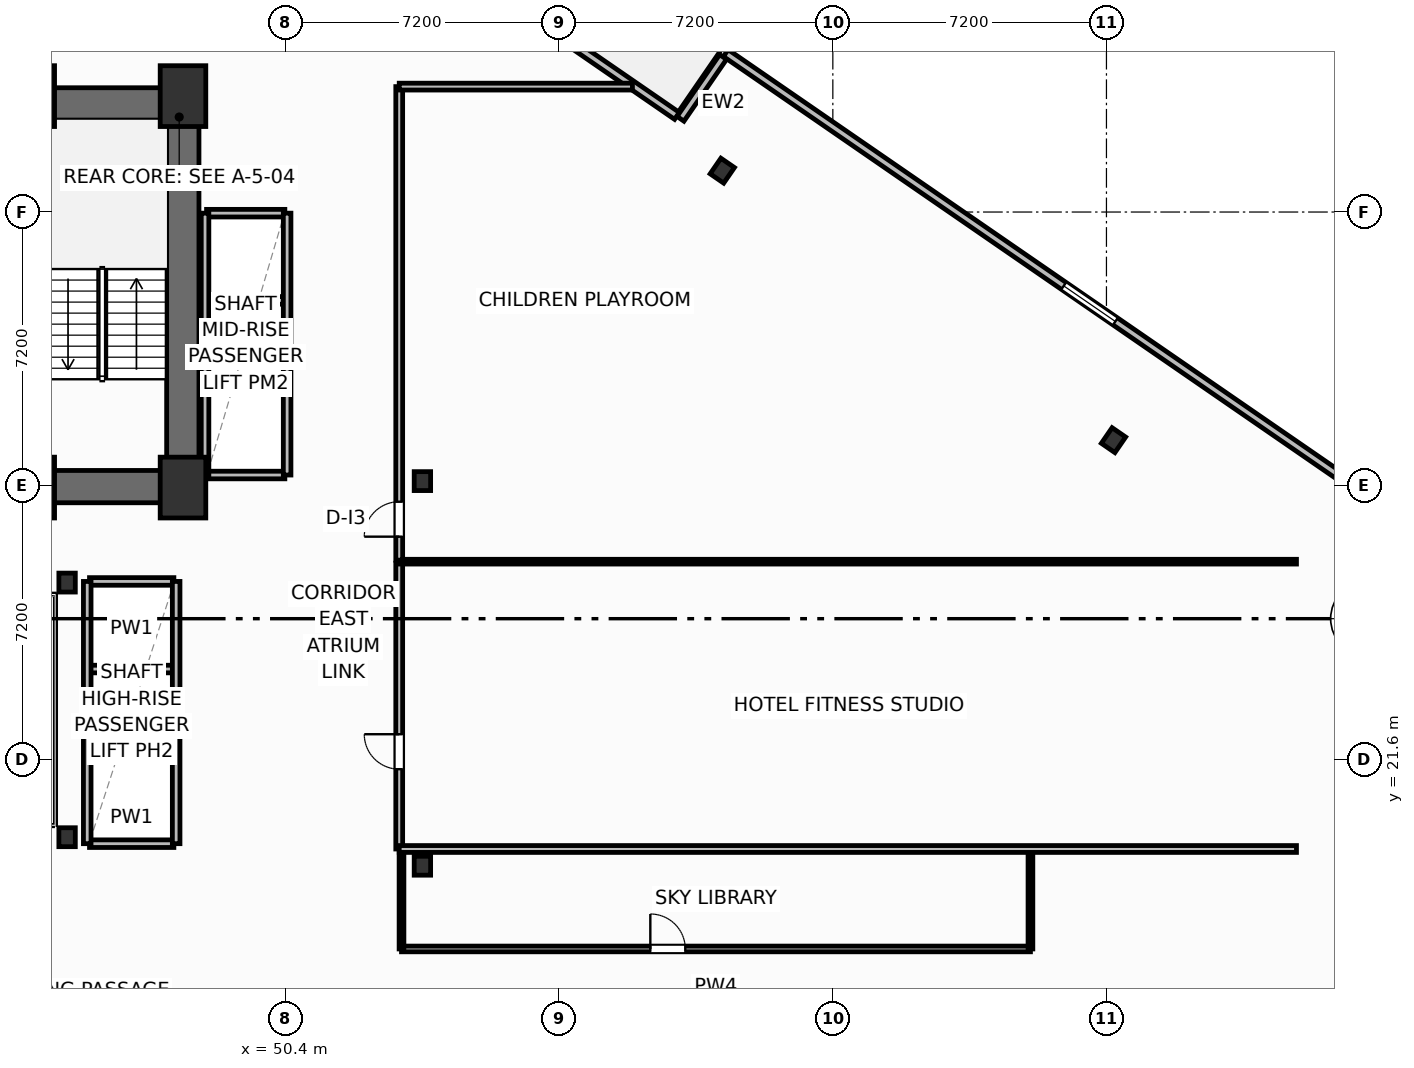
"""IFC4 building model, lengths in metres.
Left out: names, types, materials, properties, quantities, classifications, styles, units other than length and angle.
Written with IfcOpenShell. Run it as: python <this file> out.ifc"""

import sys

from ifc_helpers import new_model, si_unit, direction, frame, frame_2d, origin, origin_2d, place, context, subcontext, project, spatial, rectangle, i_section, extrude, element, fill, save


model = new_model("IFC4")
c1 = context("Model", 3, precision=1e-05, world=origin(), true_north=direction((0.0, 1.0)))
c2 = subcontext(c1, "Body", "Model", "MODEL_VIEW")
j1 = project(units=[si_unit("LENGTHUNIT", "METRE"), si_unit("PLANEANGLEUNIT", "RADIAN")], contexts=[c1])
p1 = place(None, origin())
s1 = spatial("IfcSite", under=j1, at=p1, CompositionType="ELEMENT")
p2 = place(p1, origin())
s2 = spatial("IfcBuilding", under=s1, at=p2, CompositionType="ELEMENT")
p3 = place(p2, frame((0.0, 0.0, 64.0)))
s3 = spatial("IfcBuildingStorey", under=s2, at=p3, CompositionType="ELEMENT", Elevation=64.0)
for number, where, z_axis, x_axis in (
    (1, (43.72, 28.75, 0.0), (0.0, 0.0, 1.0), (1.0, 0.0, 0.0)),
    (2, (47.7, 28.75, 0.0), (0.0, 0.0, 1.0), (1.0, 0.0, 0.0)),
    (3, (43.72, 39.05, 0.0), (0.0, 0.0, 1.0), (1.0, 0.0, 0.0)),
    (4, (47.7, 39.05, 0.0), (0.0, 0.0, 1.0), (1.0, 0.0, 0.0)),
):
    element("IfcColumn", number, at=place(p3, frame(where, z_axis=z_axis, x_axis=x_axis)), inside=s3, PredefinedType="COLUMN", context=c2, shape_type="SweptSolid", body=[
        extrude(rectangle(XDim=1.2, YDim=1.6, at=origin_2d()), origin(), (0.0, 0.0, 1.0), 3.7),
    ])
for number, where, z_axis, x_axis in (
    (5, (44.65, 19.55, 0.0), (0.0, 0.0, 1.0), (1.0, 0.0, 0.0)),
    (6, (44.65, 26.25, 0.0), (0.0, 0.0, 1.0), (1.0, 0.0, 0.0)),
    (7, (54.0, 18.8, 0.0), (0.0, 0.0, 1.0), (1.0, 0.0, 0.0)),
    (8, (54.0, 28.92, 0.0), (0.0, 0.0, 1.0), (1.0, 0.0, 0.0)),
):
    element("IfcColumn", number, at=place(p3, frame(where, z_axis=z_axis, x_axis=x_axis)), inside=s3, PredefinedType="COLUMN", context=c2, shape_type="SweptSolid", body=[
        extrude(i_section(OverallWidth=0.432, OverallDepth=0.498, WebThickness=0.056, FlangeThickness=0.089, FilletRadius=0.025, at=origin_2d()), origin(), (0.0, 0.0, 1.0), 3.7),
    ])
p4 = place(p3, frame((30.28, 38.845, 0.0), z_axis=(0.0, 0.0, 1.0), x_axis=(1.0, 0.0, 0.0)))
e9 = element("IfcWall", 9, at=p4, inside=s3, PredefinedType="SHEAR", context=c2, shape_type="SweptSolid", body=[
    extrude(rectangle(XDim=17.84, YDim=0.85, at=frame_2d((8.92, 0.0))), origin(), (0.0, 0.0, 1.0), 3.45),
])
p5 = place(p3, frame((47.695, 29.2, 0.0), z_axis=(0.0, 0.0, 1.0), x_axis=(0.0, 1.0, 0.0)))
e10 = element("IfcWall", 10, at=p5, inside=s3, PredefinedType="SHEAR", context=c2, shape_type="SweptSolid", body=[
    extrude(rectangle(XDim=9.22, YDim=0.85, at=frame_2d((4.61, 0.0))), origin(), (0.0, 0.0, 1.0), 3.45),
])
p6 = place(p3, frame((43.6, 28.775, 0.0), z_axis=(0.0, 0.0, 1.0), x_axis=(1.0, 0.0, 0.0)))
e11 = element("IfcWall", 11, at=p6, inside=s3, PredefinedType="SHEAR", context=c2, shape_type="SweptSolid", body=[
    extrude(rectangle(XDim=4.52, YDim=0.85, at=frame_2d((2.26, 0.0))), origin(), (0.0, 0.0, 1.0), 3.45),
])
for number, where, z_axis, x_axis in (
    (12, (72.186, 29.997, 0.0), (0.0, 0.0, 1.0), (0.824, -0.567, 0.0)),
    (13, (61.891, 37.088, 0.0), (0.0, 0.0, 1.0), (0.824, -0.567, 0.0)),
):
    element("IfcColumn", number, at=place(p3, frame(where, z_axis=z_axis, x_axis=x_axis)), inside=s3, PredefinedType="COLUMN", context=c2, shape_type="SweptSolid", body=[
        extrude(i_section(OverallWidth=0.432, OverallDepth=0.498, WebThickness=0.056, FlangeThickness=0.089, FilletRadius=0.025, at=origin_2d()), origin(), (0.0, 0.0, 1.0), 3.7),
    ])
p7 = place(p3, frame((55.757, 41.933, 0.0), z_axis=(0.0, 0.0, 1.0), x_axis=(0.823534636215, -0.567265989598, 0.0)))
e14 = element("IfcWall", 14, at=p7, inside=s3, PredefinedType="SOLIDWALL", context=c2, shape_type="SweptSolid", body=[
    extrude(rectangle(XDim=6.0, YDim=0.22, at=frame_2d((3.0, 0.0))), origin(), (0.0, 0.0, 1.0), 2.73),
])
p8 = place(p7, frame((0.696, 0.0, 0.0)))
e15 = element("IfcOpeningElement", 15, at=p8, cuts=e14, PredefinedType="OPENING", context=c2, shape_type="SweptSolid", body=[
    extrude(rectangle(XDim=1.5, YDim=2.25, at=frame_2d((0.75, 1.125))), frame((0.0, 0.12, 0.0), z_axis=(0.0, -1.0, 0.0), x_axis=(1.0, 0.0, 0.0)), (0.0, 0.0, 1.0), 0.24),
])
p9 = place(p3, frame((81.127, 26.995, 0.0), z_axis=(0.0, 0.0, 1.0), x_axis=(-0.823530169317, 0.567272474411, 0.0)))
e16 = element("IfcWall", 16, at=p9, inside=s3, PredefinedType="SOLIDWALL", context=c2, shape_type="SweptSolid", body=[
    extrude(rectangle(XDim=23.247, YDim=0.22, at=frame_2d((11.624, 0.0))), origin(), (0.0, 0.0, 1.0), 2.73),
])
p10 = place(p9, frame((10.799, 0.0, 0.8)))
e17 = element("IfcOpeningElement", 17, at=p10, cuts=e16, PredefinedType="OPENING", context=c2, shape_type="SweptSolid", body=[
    extrude(rectangle(XDim=1.65, YDim=1.65, at=frame_2d((0.825, 0.825))), frame((0.0, 0.12, 0.0), z_axis=(0.0, -1.0, 0.0), x_axis=(1.0, 0.0, 0.0)), (0.0, 0.0, 1.0), 0.24),
])
p11 = place(p3, frame((61.912, 40.079, 0.0), z_axis=(0.0, 0.0, 1.0), x_axis=(-0.567189720735, -0.82358716642, 0.0)))
e18 = element("IfcWall", 18, at=p11, inside=s3, PredefinedType="SOLIDWALL", context=c2, shape_type="SweptSolid", body=[
    extrude(rectangle(XDim=1.975, YDim=0.22, at=frame_2d((0.987, 0.0))), origin(), (0.0, 0.0, 1.0), 2.73),
])
p12 = place(p3, frame((53.45, 16.61, 0.0), z_axis=(0.0, 0.0, 1.0), x_axis=(1.0, 0.0, 0.0)))
e19 = element("IfcWall", 19, at=p12, inside=s3, PredefinedType="PARTITIONING", context=c2, shape_type="SweptSolid", body=[
    extrude(rectangle(XDim=16.55, YDim=0.15, at=frame_2d((8.275, 0.0))), origin(), (0.0, 0.0, 1.0), 2.58),
])
p13 = place(p12, frame((6.548, 0.0, 0.0)))
e20 = element("IfcOpeningElement", 20, at=p13, cuts=e19, PredefinedType="OPENING", context=c2, shape_type="SweptSolid", body=[
    extrude(rectangle(XDim=0.92, YDim=2.05, at=frame_2d((0.46, 1.025))), frame((0.0, 0.085, 0.0), z_axis=(0.0, -1.0, 0.0), x_axis=(1.0, 0.0, 0.0)), (0.0, 0.0, 1.0), 0.17),
])
for number, where, z_axis, x_axis in (
    (21, (53.45, 16.61, 0.0), (0.0, 0.0, 1.0), (0.0, 1.0, 0.0)),
    (22, (70.0, 16.61, 0.0), (0.0, 0.0, 1.0), (0.0, 1.0, 0.0)),
):
    element("IfcWall", number, at=place(p3, frame(where, z_axis=z_axis, x_axis=x_axis)), inside=s3, PredefinedType="PARTITIONING", context=c2, shape_type="SweptSolid", body=[
        extrude(rectangle(XDim=2.63, YDim=0.125, at=frame_2d((1.315, 0.0))), origin(), (0.0, 0.0, 1.0), 3.45),
    ])
p14 = place(p3, frame((53.39, 19.24, 0.0), z_axis=(0.0, 0.0, 1.0), x_axis=(0.0, 1.0, 0.0)))
e23 = element("IfcWall", 23, at=p14, inside=s3, PredefinedType="PARTITIONING", context=c2, shape_type="SweptSolid", body=[
    extrude(rectangle(XDim=7.52, YDim=0.18, at=frame_2d((3.76, 0.0))), origin(), (0.0, 0.0, 1.0), 3.45),
])
p15 = place(p14, frame((2.1, 0.0, 0.0)))
e24 = element("IfcOpeningElement", 24, at=p15, cuts=e23, PredefinedType="OPENING", context=c2, shape_type="SweptSolid", body=[
    extrude(rectangle(XDim=0.92, YDim=2.05, at=frame_2d((0.46, 1.025))), frame((0.0, 0.1, 0.0), z_axis=(0.0, -1.0, 0.0), x_axis=(1.0, 0.0, 0.0)), (0.0, 0.0, 1.0), 0.2),
])
p16 = place(p3, frame((53.39, 26.8, 0.0), z_axis=(0.0, 0.0, 1.0), x_axis=(1.0, 0.0, 0.0)))
e25 = element("IfcWall", 25, at=p16, inside=s3, PredefinedType="PARTITIONING", context=c2, shape_type="SweptSolid", body=[
    extrude(rectangle(XDim=23.61, YDim=0.125, at=frame_2d((11.805, 0.0))), origin(), (0.0, 0.0, 1.0), 3.45),
])
p17 = place(p3, frame((53.39, 19.24, 0.0), z_axis=(0.0, 0.0, 1.0), x_axis=(1.0, 0.0, 0.0)))
e26 = element("IfcWall", 26, at=p17, inside=s3, PredefinedType="PARTITIONING", context=c2, shape_type="SweptSolid", body=[
    extrude(rectangle(XDim=23.61, YDim=0.18, at=frame_2d((11.805, 0.0))), origin(), (0.0, 0.0, 1.0), 3.45),
])
p18 = place(p3, frame((53.39, 26.84, 0.0), z_axis=(0.0, 0.0, 1.0), x_axis=(0.0, 1.0, 0.0)))
e27 = element("IfcWall", 27, at=p18, inside=s3, PredefinedType="PARTITIONING", context=c2, shape_type="SweptSolid", body=[
    extrude(rectangle(XDim=12.46, YDim=0.18, at=frame_2d((6.23, 0.0))), origin(), (0.0, 0.0, 1.0), 3.45),
])
p19 = place(p18, frame((0.618, 0.0, 0.0)))
e28 = element("IfcOpeningElement", 28, at=p19, cuts=e27, PredefinedType="OPENING", context=c2, shape_type="SweptSolid", body=[
    extrude(rectangle(XDim=0.92, YDim=2.05, at=frame_2d((0.46, 1.025))), frame((0.0, 0.1, 0.0), z_axis=(0.0, -1.0, 0.0), x_axis=(1.0, 0.0, 0.0)), (0.0, 0.0, 1.0), 0.2),
])
p20 = place(p3, frame((53.39, 39.3, 0.0), z_axis=(0.0, 0.0, 1.0), x_axis=(1.0, 0.0, 0.0)))
e29 = element("IfcWall", 29, at=p20, inside=s3, PredefinedType="PARTITIONING", context=c2, shape_type="SweptSolid", body=[
    extrude(rectangle(XDim=6.136, YDim=0.18, at=frame_2d((3.068, 0.0))), origin(), (0.0, 0.0, 1.0), 3.45),
])
for number, where, z_axis, x_axis in (
    (30, (48.32, 31.375, 0.0), (0.0, 0.0, 1.0), (1.0, 0.0, 0.0)),
    (31, (48.32, 33.675, 0.0), (0.0, 0.0, 1.0), (1.0, 0.0, 0.0)),
):
    element("IfcWall", number, at=place(p3, frame(where, z_axis=z_axis, x_axis=x_axis)), inside=s3, PredefinedType="PARTITIONING", context=c2, shape_type="SweptSolid", body=[
        extrude(rectangle(XDim=2.06, YDim=0.2, at=frame_2d((1.03, 0.0))), origin(), (0.0, 0.0, 1.0), 3.45),
    ])
p21 = place(p3, frame((48.32, 29.08, 0.0), z_axis=(0.0, 0.0, 1.0), x_axis=(1.0, 0.0, 0.0)))
e32 = element("IfcWall", 32, at=p21, inside=s3, PredefinedType="PARTITIONING", context=c2, shape_type="SweptSolid", body=[
    extrude(rectangle(XDim=2.06, YDim=0.2, at=frame_2d((1.03, 0.0))), origin(), (0.0, 0.0, 1.0), 2.662),
])
p22 = place(p3, frame((48.32, 35.97, 0.0), z_axis=(0.0, 0.0, 1.0), x_axis=(1.0, 0.0, 0.0)))
e33 = element("IfcWall", 33, at=p22, inside=s3, PredefinedType="PARTITIONING", context=c2, shape_type="SweptSolid", body=[
    extrude(rectangle(XDim=2.06, YDim=0.2, at=frame_2d((1.03, 0.0))), origin(), (0.0, 0.0, 1.0), 3.45),
])
for number, where, z_axis, x_axis in (
    (34, (48.28, 29.08, 0.0), (0.0, 0.0, 1.0), (0.0, 1.0, 0.0)),
    (35, (50.44, 29.08, 0.0), (0.0, 0.0, 1.0), (0.0, 1.0, 0.0)),
):
    element("IfcWall", number, at=place(p3, frame(where, z_axis=z_axis, x_axis=x_axis)), inside=s3, PredefinedType="PARTITIONING", context=c2, shape_type="SweptSolid", body=[
        extrude(rectangle(XDim=6.89, YDim=0.2, at=frame_2d((3.445, 0.0))), origin(), (0.0, 0.0, 1.0), 3.45),
    ])
for number, where, z_axis, x_axis in (
    (36, (45.24, 21.675, 0.0), (0.0, 0.0, 1.0), (1.0, 0.0, 0.0)),
    (37, (45.24, 23.975, 0.0), (0.0, 0.0, 1.0), (1.0, 0.0, 0.0)),
):
    element("IfcWall", number, at=place(p3, frame(where, z_axis=z_axis, x_axis=x_axis)), inside=s3, PredefinedType="PARTITIONING", context=c2, shape_type="SweptSolid", body=[
        extrude(rectangle(XDim=2.22, YDim=0.2, at=frame_2d((1.11, 0.0))), origin(), (0.0, 0.0, 1.0), 3.45),
    ])
p23 = place(p3, frame((45.24, 19.38, 0.0), z_axis=(0.0, 0.0, 1.0), x_axis=(1.0, 0.0, 0.0)))
e38 = element("IfcWall", 38, at=p23, inside=s3, PredefinedType="PARTITIONING", context=c2, shape_type="SweptSolid", body=[
    extrude(rectangle(XDim=2.22, YDim=0.2, at=frame_2d((1.11, 0.0))), origin(), (0.0, 0.0, 1.0), 2.662),
])
p24 = place(p3, frame((45.24, 26.28, 0.0), z_axis=(0.0, 0.0, 1.0), x_axis=(1.0, 0.0, 0.0)))
e39 = element("IfcWall", 39, at=p24, inside=s3, PredefinedType="PARTITIONING", context=c2, shape_type="SweptSolid", body=[
    extrude(rectangle(XDim=2.22, YDim=0.2, at=frame_2d((1.11, 0.0))), origin(), (0.0, 0.0, 1.0), 3.45),
])
for number, where, z_axis, x_axis in (
    (40, (45.18, 19.38, 0.0), (0.0, 0.0, 1.0), (0.0, 1.0, 0.0)),
    (41, (47.52, 19.38, 0.0), (0.0, 0.0, 1.0), (0.0, 1.0, 0.0)),
):
    element("IfcWall", number, at=place(p3, frame(where, z_axis=z_axis, x_axis=x_axis)), inside=s3, PredefinedType="PARTITIONING", context=c2, shape_type="SweptSolid", body=[
        extrude(rectangle(XDim=6.9, YDim=0.2, at=frame_2d((3.45, 0.0))), origin(), (0.0, 0.0, 1.0), 3.45),
    ])
p25 = place(p10, origin())
e42 = element("IfcWindow", 42, at=p25, inside=s3, PartitioningType="SINGLE_PANEL", PredefinedType="WINDOW", context=c2, shape_type="SweptSolid", body=[
    extrude(rectangle(XDim=1.65, YDim=1.65, at=frame_2d((0.825, 0.825))), frame((0.0, 0.03, 0.0), z_axis=(0.0, -1.0, 0.0), x_axis=(1.0, 0.0, 0.0)), (0.0, 0.0, 1.0), 0.06),
])
fill(e17, e42)
p26 = place(p13, origin())
e43 = element("IfcDoor", 43, at=p26, inside=s3, OperationType="SINGLE_SWING_LEFT", PredefinedType="DOOR", context=c2, shape_type="SweptSolid", body=[
    extrude(rectangle(XDim=0.92, YDim=2.05, at=frame_2d((0.46, 1.025))), frame((0.0, 0.025, 0.0), z_axis=(0.0, -1.0, 0.0), x_axis=(1.0, 0.0, 0.0)), (0.0, 0.0, 1.0), 0.05),
])
fill(e20, e43)
p27 = place(p15, origin())
e44 = element("IfcDoor", 44, at=p27, inside=s3, OperationType="SINGLE_SWING_RIGHT", PredefinedType="DOOR", context=c2, shape_type="SweptSolid", body=[
    extrude(rectangle(XDim=0.92, YDim=2.05, at=frame_2d((0.46, 1.025))), frame((0.0, 0.025, 0.0), z_axis=(0.0, -1.0, 0.0), x_axis=(1.0, 0.0, 0.0)), (0.0, 0.0, 1.0), 0.05),
])
fill(e24, e44)
p28 = place(p19, origin())
e45 = element("IfcDoor", 45, at=p28, inside=s3, OperationType="SINGLE_SWING_LEFT", PredefinedType="DOOR", context=c2, shape_type="SweptSolid", body=[
    extrude(rectangle(XDim=0.92, YDim=2.05, at=frame_2d((0.46, 1.025))), frame((0.0, 0.025, 0.0), z_axis=(0.0, -1.0, 0.0), x_axis=(1.0, 0.0, 0.0)), (0.0, 0.0, 1.0), 0.05),
])
fill(e28, e45)
save(model, sys.argv[1])
